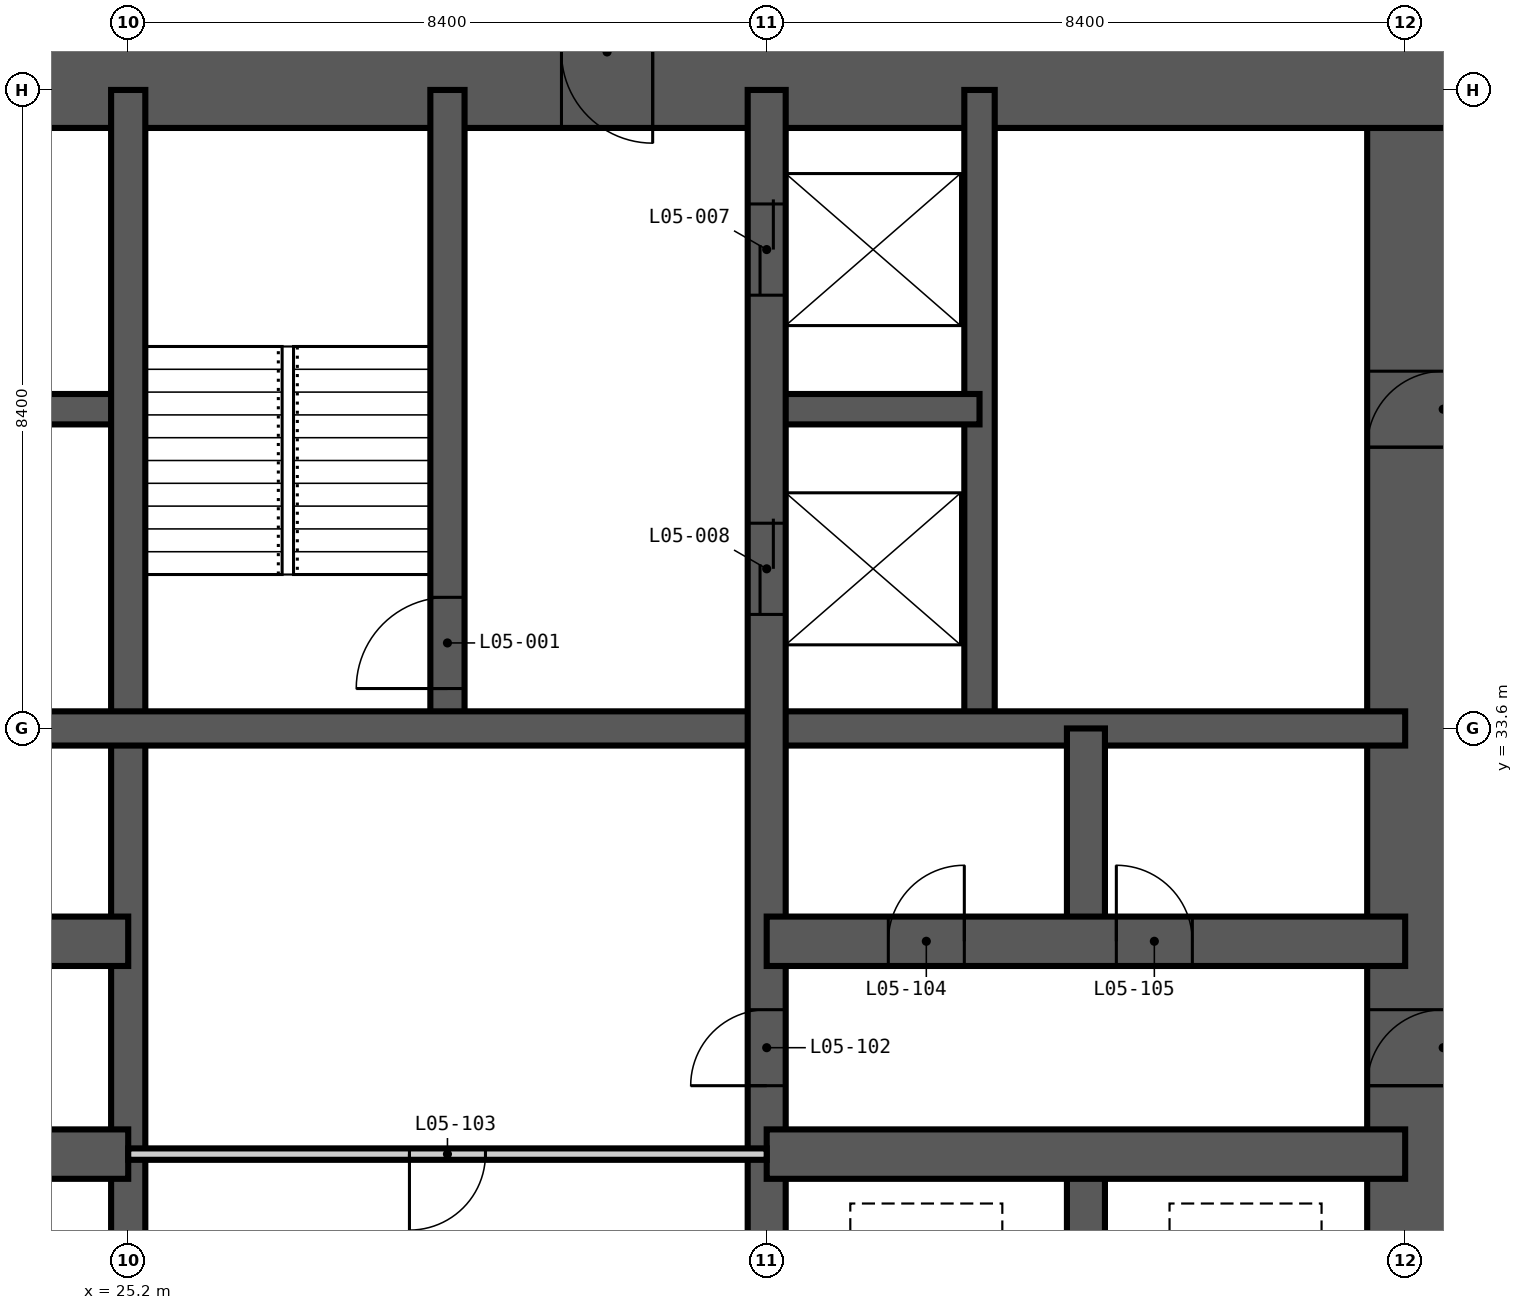
"""IFC4 building model, lengths in metres.
Left out: names, types, materials, properties, quantities, classifications, styles, units other than length and angle.
Written with IfcOpenShell. Run it as: python <this file> out.ifc"""

import sys

from ifc_helpers import new_model, si_unit, direction, frame, frame_2d, origin, place, context, subcontext, project, spatial, rectangle, extrude, element, fill, save


model = new_model("IFC4")
c1 = context("Model", 3, precision=1e-05, world=origin(), true_north=direction((0.0, 1.0)))
c2 = subcontext(c1, "Body", "Model", "MODEL_VIEW")
j1 = project(units=[si_unit("LENGTHUNIT", "METRE"), si_unit("PLANEANGLEUNIT", "RADIAN")], contexts=[c1])
p1 = place(None, origin())
s1 = spatial("IfcSite", under=j1, at=p1, CompositionType="ELEMENT")
p2 = place(p1, origin())
s2 = spatial("IfcBuilding", under=s1, at=p2, CompositionType="ELEMENT")
p3 = place(p2, frame((0.0, 0.0, 27.0)))
s3 = spatial("IfcBuildingStorey", under=s2, at=p3, CompositionType="ELEMENT", Elevation=27.0)
p4 = place(p3, frame((42.5, 17.3, -0.35), z_axis=(0.0, 0.0, 1.0), x_axis=(0.0, 1.0, 0.0)))
e1 = element("IfcWall", 1, at=p4, inside=s3, PredefinedType="SHEAR", context=c2, shape_type="SweptSolid", body=[
    extrude(rectangle(XDim=24.2, YDim=2.0, at=frame_2d((12.1, 0.0))), origin(), (0.0, 0.0, 1.0), 3.6),
])
p5 = place(p4, frame((0.3, 0.0, 0.35)))
e2 = element("IfcOpeningElement", 2, at=p5, cuts=e1, PredefinedType="OPENING", context=c2, shape_type="SweptSolid", body=[
    extrude(rectangle(XDim=1.2, YDim=2.2, at=frame_2d((0.6, 1.1))), frame((0.0, 1.01, 0.0), z_axis=(0.0, -1.0, 0.0), x_axis=(1.0, 0.0, 0.0)), (0.0, 0.0, 1.0), 2.02),
])
p6 = place(p4, frame((11.6, 0.0, 0.35)))
e3 = element("IfcOpeningElement", 3, at=p6, cuts=e1, PredefinedType="OPENING", context=c2, shape_type="SweptSolid", body=[
    extrude(rectangle(XDim=1.0, YDim=2.1, at=frame_2d((0.5, 1.05))), frame((0.0, 1.01, 0.0), z_axis=(0.0, -1.0, 0.0), x_axis=(1.0, 0.0, 0.0)), (0.0, 0.0, 1.0), 2.02),
])
p7 = place(p4, frame((20.0, 0.0, 0.35)))
e4 = element("IfcOpeningElement", 4, at=p7, cuts=e1, PredefinedType="OPENING", context=c2, shape_type="SweptSolid", body=[
    extrude(rectangle(XDim=1.0, YDim=2.1, at=frame_2d((0.5, 1.05))), frame((0.0, 1.01, 0.0), z_axis=(0.0, -1.0, 0.0), x_axis=(1.0, 0.0, 0.0)), (0.0, 0.0, 1.0), 2.02),
])
p8 = place(p3, frame((43.5, 42.5, -0.35), z_axis=(0.0, 0.0, 1.0), x_axis=(-1.0, 0.0, 0.0)))
e5 = element("IfcWall", 5, at=p8, inside=s3, PredefinedType="SHEAR", context=c2, shape_type="SweptSolid", body=[
    extrude(rectangle(XDim=28.2, YDim=2.0, at=frame_2d((14.1, 0.0))), origin(), (0.0, 0.0, 1.0), 3.6),
])
p9 = place(p8, frame((22.0, 0.0, 0.35)))
e6 = element("IfcOpeningElement", 6, at=p9, cuts=e5, PredefinedType="OPENING", context=c2, shape_type="SweptSolid", body=[
    extrude(rectangle(XDim=1.0, YDim=2.1, at=frame_2d((0.5, 1.05))), frame((0.0, 1.01, 0.0), z_axis=(0.0, -1.0, 0.0), x_axis=(1.0, 0.0, 0.0)), (0.0, 0.0, 1.0), 2.02),
])
p10 = place(p8, frame((11.4, 0.0, 0.35)))
e7 = element("IfcOpeningElement", 7, at=p10, cuts=e5, PredefinedType="OPENING", context=c2, shape_type="SweptSolid", body=[
    extrude(rectangle(XDim=1.2, YDim=2.2, at=frame_2d((0.6, 1.1))), frame((0.0, 1.01, 0.0), z_axis=(0.0, -1.0, 0.0), x_axis=(1.0, 0.0, 0.0)), (0.0, 0.0, 1.0), 2.02),
])
for number, where, z_axis, x_axis in (
    (8, (36.4, 33.6, -0.35), (0.0, 0.0, 1.0), (0.0, 1.0, 0.0)),
    (9, (16.8, 37.8, -0.35), (0.0, 0.0, 1.0), (1.0, 0.0, 0.0)),
):
    element("IfcWall", number, at=place(p3, frame(where, z_axis=z_axis, x_axis=x_axis)), inside=s3, PredefinedType="SHEAR", context=c2, shape_type="SweptSolid", body=[
        extrude(rectangle(XDim=8.4, YDim=0.4, at=frame_2d((4.2, 0.0))), origin(), (0.0, 0.0, 1.0), 3.6),
    ])
p11 = place(p3, frame((33.6, 37.8, -0.35), z_axis=(0.0, 0.0, 1.0), x_axis=(1.0, 0.0, 0.0)))
e10 = element("IfcWall", 10, at=p11, inside=s3, PredefinedType="SHEAR", context=c2, shape_type="SweptSolid", body=[
    extrude(rectangle(XDim=2.8, YDim=0.4, at=frame_2d((1.4, 0.0))), origin(), (0.0, 0.0, 1.0), 3.6),
])
p12 = place(p3, frame((25.2, 16.8, -0.35), z_axis=(0.0, 0.0, 1.0), x_axis=(0.0, 1.0, 0.0)))
e11 = element("IfcWall", 11, at=p12, inside=s3, PredefinedType="SHEAR", context=c2, shape_type="SweptSolid", body=[
    extrude(rectangle(XDim=25.2, YDim=0.45, at=frame_2d((12.6, 0.0))), origin(), (0.0, 0.0, 1.0), 3.6),
])
p13 = place(p3, frame((29.4, 33.6, -0.35), z_axis=(0.0, 0.0, 1.0), x_axis=(0.0, 1.0, 0.0)))
e12 = element("IfcWall", 12, at=p13, inside=s3, PredefinedType="SHEAR", context=c2, shape_type="SweptSolid", body=[
    extrude(rectangle(XDim=8.4, YDim=0.45, at=frame_2d((4.2, 0.0))), origin(), (0.0, 0.0, 1.0), 3.6),
])
p14 = place(p13, frame((0.525, 0.0, 0.35)))
e13 = element("IfcOpeningElement", 13, at=p14, cuts=e12, PredefinedType="OPENING", context=c2, shape_type="SweptSolid", body=[
    extrude(rectangle(XDim=1.2, YDim=2.2, at=frame_2d((0.6, 1.1))), frame((0.0, 0.235, 0.0), z_axis=(0.0, -1.0, 0.0), x_axis=(1.0, 0.0, 0.0)), (0.0, 0.0, 1.0), 0.47),
])
p15 = place(p3, frame((16.8, 33.6, -0.35), z_axis=(0.0, 0.0, 1.0), x_axis=(1.0, 0.0, 0.0)))
e14 = element("IfcWall", 14, at=p15, inside=s3, PredefinedType="SHEAR", context=c2, shape_type="SweptSolid", body=[
    extrude(rectangle(XDim=25.2, YDim=0.45, at=frame_2d((12.6, 0.0))), origin(), (0.0, 0.0, 1.0), 3.6),
])
p16 = place(p3, frame((33.6, 16.8, -0.35), z_axis=(0.0, 0.0, 1.0), x_axis=(0.0, 1.0, 0.0)))
e15 = element("IfcWall", 15, at=p16, inside=s3, PredefinedType="SHEAR", context=c2, shape_type="SweptSolid", body=[
    extrude(rectangle(XDim=25.2, YDim=0.5, at=frame_2d((12.6, 0.0))), origin(), (0.0, 0.0, 1.0), 3.6),
])
p17 = place(p16, frame((22.5, 0.0, 0.35)))
e16 = element("IfcOpeningElement", 16, at=p17, cuts=e15, PredefinedType="OPENING", context=c2, shape_type="SweptSolid", body=[
    extrude(rectangle(XDim=1.2, YDim=2.2, at=frame_2d((0.6, 1.1))), frame((0.0, 0.26, 0.0), z_axis=(0.0, -1.0, 0.0), x_axis=(1.0, 0.0, 0.0)), (0.0, 0.0, 1.0), 0.52),
])
p18 = place(p16, frame((18.3, 0.0, 0.35)))
e17 = element("IfcOpeningElement", 17, at=p18, cuts=e15, PredefinedType="OPENING", context=c2, shape_type="SweptSolid", body=[
    extrude(rectangle(XDim=1.2, YDim=2.2, at=frame_2d((0.6, 1.1))), frame((0.0, 0.26, 0.0), z_axis=(0.0, -1.0, 0.0), x_axis=(1.0, 0.0, 0.0)), (0.0, 0.0, 1.0), 0.52),
])
p19 = place(p16, frame((12.1, 0.0, 0.35)))
e18 = element("IfcOpeningElement", 18, at=p19, cuts=e15, PredefinedType="OPENING", context=c2, shape_type="SweptSolid", body=[
    extrude(rectangle(XDim=1.0, YDim=2.1, at=frame_2d((0.5, 1.05))), frame((0.0, 0.26, 0.0), z_axis=(0.0, -1.0, 0.0), x_axis=(1.0, 0.0, 0.0)), (0.0, 0.0, 1.0), 0.52),
])
p20 = place(p3, frame((37.8, 16.8, -0.35), z_axis=(0.0, 0.0, 1.0), x_axis=(0.0, 1.0, 0.0)))
e19 = element("IfcWall", 19, at=p20, inside=s3, PredefinedType="SHEAR", context=c2, shape_type="SweptSolid", body=[
    extrude(rectangle(XDim=11.2, YDim=0.5, at=frame_2d((5.6, 0.0))), origin(), (0.0, 0.0, 1.0), 3.6),
])
p21 = place(p3, frame((37.8, 30.8, -0.35), z_axis=(0.0, 0.0, 1.0), x_axis=(0.0, 1.0, 0.0)))
e20 = element("IfcWall", 20, at=p21, inside=s3, PredefinedType="SHEAR", context=c2, shape_type="SweptSolid", body=[
    extrude(rectangle(XDim=2.8, YDim=0.5, at=frame_2d((1.4, 0.0))), origin(), (0.0, 0.0, 1.0), 3.6),
])
p22 = place(p3, frame((16.8, 28.0, -0.35), z_axis=(0.0, 0.0, 1.0), x_axis=(1.0, 0.0, 0.0)))
e21 = element("IfcWall", 21, at=p22, inside=s3, PredefinedType="SHEAR", context=c2, shape_type="SweptSolid", body=[
    extrude(rectangle(XDim=8.4, YDim=0.65, at=frame_2d((4.2, 0.0))), origin(), (0.0, 0.0, 1.0), 3.6),
])
p23 = place(p22, frame((1.55, 0.0, 0.35)))
e22 = element("IfcOpeningElement", 22, at=p23, cuts=e21, PredefinedType="OPENING", context=c2, shape_type="SweptSolid", body=[
    extrude(rectangle(XDim=1.1, YDim=2.2, at=frame_2d((0.55, 1.1))), frame((0.0, 0.335, 0.0), z_axis=(0.0, -1.0, 0.0), x_axis=(1.0, 0.0, 0.0)), (0.0, 0.0, 1.0), 0.67),
])
p24 = place(p22, frame((5.75, 0.0, 0.35)))
e23 = element("IfcOpeningElement", 23, at=p24, cuts=e21, PredefinedType="OPENING", context=c2, shape_type="SweptSolid", body=[
    extrude(rectangle(XDim=1.1, YDim=2.2, at=frame_2d((0.55, 1.1))), frame((0.0, 0.335, 0.0), z_axis=(0.0, -1.0, 0.0), x_axis=(1.0, 0.0, 0.0)), (0.0, 0.0, 1.0), 0.67),
])
p25 = place(p3, frame((33.6, 28.0, -0.35), z_axis=(0.0, 0.0, 1.0), x_axis=(1.0, 0.0, 0.0)))
e24 = element("IfcWall", 24, at=p25, inside=s3, PredefinedType="SHEAR", context=c2, shape_type="SweptSolid", body=[
    extrude(rectangle(XDim=8.4, YDim=0.65, at=frame_2d((4.2, 0.0))), origin(), (0.0, 0.0, 1.0), 3.6),
])
p26 = place(p3, frame((16.8, 30.8, -0.35), z_axis=(0.0, 0.0, 1.0), x_axis=(1.0, 0.0, 0.0)))
e25 = element("IfcWall", 25, at=p26, inside=s3, PredefinedType="SHEAR", context=c2, shape_type="SweptSolid", body=[
    extrude(rectangle(XDim=8.4, YDim=0.65, at=frame_2d((4.2, 0.0))), origin(), (0.0, 0.0, 1.0), 3.6),
])
p27 = place(p26, frame((1.55, 0.0, 0.35)))
e26 = element("IfcOpeningElement", 26, at=p27, cuts=e25, PredefinedType="OPENING", context=c2, shape_type="SweptSolid", body=[
    extrude(rectangle(XDim=1.1, YDim=2.2, at=frame_2d((0.55, 1.1))), frame((0.0, 0.335, 0.0), z_axis=(0.0, -1.0, 0.0), x_axis=(1.0, 0.0, 0.0)), (0.0, 0.0, 1.0), 0.67),
])
p28 = place(p26, frame((5.75, 0.0, 0.35)))
e27 = element("IfcOpeningElement", 27, at=p28, cuts=e25, PredefinedType="OPENING", context=c2, shape_type="SweptSolid", body=[
    extrude(rectangle(XDim=1.1, YDim=2.2, at=frame_2d((0.55, 1.1))), frame((0.0, 0.335, 0.0), z_axis=(0.0, -1.0, 0.0), x_axis=(1.0, 0.0, 0.0)), (0.0, 0.0, 1.0), 0.67),
])
p29 = place(p3, frame((33.6, 30.8, -0.35), z_axis=(0.0, 0.0, 1.0), x_axis=(1.0, 0.0, 0.0)))
e28 = element("IfcWall", 28, at=p29, inside=s3, PredefinedType="SHEAR", context=c2, shape_type="SweptSolid", body=[
    extrude(rectangle(XDim=8.4, YDim=0.65, at=frame_2d((4.2, 0.0))), origin(), (0.0, 0.0, 1.0), 3.6),
])
p30 = place(p29, frame((1.6, 0.0, 0.35)))
e29 = element("IfcOpeningElement", 29, at=p30, cuts=e28, PredefinedType="OPENING", context=c2, shape_type="SweptSolid", body=[
    extrude(rectangle(XDim=1.0, YDim=2.1, at=frame_2d((0.5, 1.05))), frame((0.0, 0.335, 0.0), z_axis=(0.0, -1.0, 0.0), x_axis=(1.0, 0.0, 0.0)), (0.0, 0.0, 1.0), 0.67),
])
p31 = place(p29, frame((4.6, 0.0, 0.35)))
e30 = element("IfcOpeningElement", 30, at=p31, cuts=e28, PredefinedType="OPENING", context=c2, shape_type="SweptSolid", body=[
    extrude(rectangle(XDim=1.0, YDim=2.1, at=frame_2d((0.5, 1.05))), frame((0.0, 0.335, 0.0), z_axis=(0.0, -1.0, 0.0), x_axis=(1.0, 0.0, 0.0)), (0.0, 0.0, 1.0), 0.67),
])
p32 = place(p3, frame((25.2, 28.0, 0.0), z_axis=(0.0, 0.0, 1.0), x_axis=(1.0, 0.0, 0.0)))
e31 = element("IfcWall", 31, at=p32, inside=s3, PredefinedType="PARTITIONING", context=c2, shape_type="SweptSolid", body=[
    extrude(rectangle(XDim=8.4, YDim=0.15, at=frame_2d((4.2, 0.0))), origin(), (0.0, 0.0, 1.0), 3.25),
])
p33 = place(p32, frame((3.7, 0.0, 0.0)))
e32 = element("IfcOpeningElement", 32, at=p33, cuts=e31, PredefinedType="OPENING", context=c2, shape_type="SweptSolid", body=[
    extrude(rectangle(XDim=1.0, YDim=2.1, at=frame_2d((0.5, 1.05))), frame((0.0, 0.085, 0.0), z_axis=(0.0, -1.0, 0.0), x_axis=(1.0, 0.0, 0.0)), (0.0, 0.0, 1.0), 0.17),
])
p34 = place(p14, origin())
e33 = element("IfcDoor", 33, at=p34, inside=s3, OperationType="SINGLE_SWING_LEFT", PredefinedType="DOOR", context=c2, shape_type="SweptSolid", body=[
    extrude(rectangle(XDim=1.2, YDim=2.2, at=frame_2d((0.6, 1.1))), frame((0.0, 0.025, 0.0), z_axis=(0.0, -1.0, 0.0), x_axis=(1.0, 0.0, 0.0)), (0.0, 0.0, 1.0), 0.05),
])
fill(e13, e33)
p35 = place(p17, origin())
e34 = element("IfcDoor", 34, at=p35, inside=s3, OperationType="DOUBLE_DOOR_SLIDING", PredefinedType="DOOR", context=c2, shape_type="SweptSolid", body=[
    extrude(rectangle(XDim=1.2, YDim=2.2, at=frame_2d((0.6, 1.1))), frame((0.0, 0.025, 0.0), z_axis=(0.0, -1.0, 0.0), x_axis=(1.0, 0.0, 0.0)), (0.0, 0.0, 1.0), 0.05),
])
fill(e16, e34)
p36 = place(p18, origin())
e35 = element("IfcDoor", 35, at=p36, inside=s3, OperationType="DOUBLE_DOOR_SLIDING", PredefinedType="DOOR", context=c2, shape_type="SweptSolid", body=[
    extrude(rectangle(XDim=1.2, YDim=2.2, at=frame_2d((0.6, 1.1))), frame((0.0, 0.025, 0.0), z_axis=(0.0, -1.0, 0.0), x_axis=(1.0, 0.0, 0.0)), (0.0, 0.0, 1.0), 0.05),
])
fill(e17, e35)
p37 = place(p19, origin())
e36 = element("IfcDoor", 36, at=p37, inside=s3, OperationType="SINGLE_SWING_LEFT", PredefinedType="DOOR", context=c2, shape_type="SweptSolid", body=[
    extrude(rectangle(XDim=1.0, YDim=2.1, at=frame_2d((0.5, 1.05))), frame((0.0, 0.025, 0.0), z_axis=(0.0, -1.0, 0.0), x_axis=(1.0, 0.0, 0.0)), (0.0, 0.0, 1.0), 0.05),
])
fill(e18, e36)
p38 = place(p33, frame((1.0, 0.0, 0.0), z_axis=(0.0, 0.0, 1.0), x_axis=(-1.0, 0.0, 0.0)))
e37 = element("IfcDoor", 37, at=p38, inside=s3, OperationType="SINGLE_SWING_RIGHT", PredefinedType="DOOR", context=c2, shape_type="SweptSolid", body=[
    extrude(rectangle(XDim=1.0, YDim=2.1, at=frame_2d((0.5, 1.05))), frame((0.0, 0.025, 0.0), z_axis=(0.0, -1.0, 0.0), x_axis=(1.0, 0.0, 0.0)), (0.0, 0.0, 1.0), 0.05),
])
fill(e32, e37)
p39 = place(p30, origin())
e38 = element("IfcDoor", 38, at=p39, inside=s3, OperationType="SINGLE_SWING_RIGHT", PredefinedType="DOOR", context=c2, shape_type="SweptSolid", body=[
    extrude(rectangle(XDim=1.0, YDim=2.1, at=frame_2d((0.5, 1.05))), frame((0.0, 0.025, 0.0), z_axis=(0.0, -1.0, 0.0), x_axis=(1.0, 0.0, 0.0)), (0.0, 0.0, 1.0), 0.05),
])
fill(e29, e38)
p40 = place(p31, origin())
e39 = element("IfcDoor", 39, at=p40, inside=s3, OperationType="SINGLE_SWING_LEFT", PredefinedType="DOOR", context=c2, shape_type="SweptSolid", body=[
    extrude(rectangle(XDim=1.0, YDim=2.1, at=frame_2d((0.5, 1.05))), frame((0.0, 0.025, 0.0), z_axis=(0.0, -1.0, 0.0), x_axis=(1.0, 0.0, 0.0)), (0.0, 0.0, 1.0), 0.05),
])
fill(e30, e39)
p41 = place(p6, origin())
e40 = element("IfcDoor", 40, at=p41, inside=s3, OperationType="SINGLE_SWING_LEFT", PredefinedType="DOOR", context=c2, shape_type="SweptSolid", body=[
    extrude(rectangle(XDim=1.0, YDim=2.1, at=frame_2d((0.5, 1.05))), frame((0.0, 0.025, 0.0), z_axis=(0.0, -1.0, 0.0), x_axis=(1.0, 0.0, 0.0)), (0.0, 0.0, 1.0), 0.05),
])
fill(e3, e40)
p42 = place(p10, origin())
e41 = element("IfcDoor", 41, at=p42, inside=s3, OperationType="SINGLE_SWING_LEFT", PredefinedType="DOOR", context=c2, shape_type="SweptSolid", body=[
    extrude(rectangle(XDim=1.2, YDim=2.2, at=frame_2d((0.6, 1.1))), frame((0.0, 0.025, 0.0), z_axis=(0.0, -1.0, 0.0), x_axis=(1.0, 0.0, 0.0)), (0.0, 0.0, 1.0), 0.05),
])
fill(e7, e41)
p43 = place(p7, origin())
e42 = element("IfcDoor", 42, at=p43, inside=s3, OperationType="SINGLE_SWING_LEFT", PredefinedType="DOOR", context=c2, shape_type="SweptSolid", body=[
    extrude(rectangle(XDim=1.0, YDim=2.1, at=frame_2d((0.5, 1.05))), frame((0.0, 0.025, 0.0), z_axis=(0.0, -1.0, 0.0), x_axis=(1.0, 0.0, 0.0)), (0.0, 0.0, 1.0), 0.05),
])
fill(e4, e42)
save(model, sys.argv[1])
